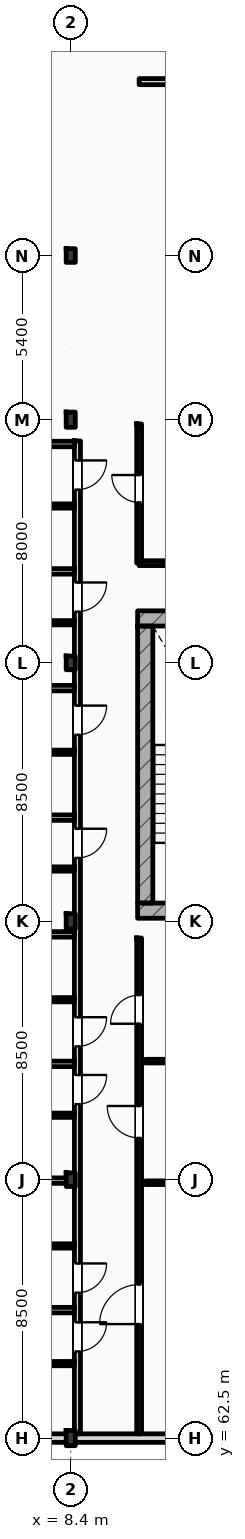
"""IFC4 building model, lengths in metres.
Left out: names, types, materials, properties, quantities, classifications, styles, units other than length and angle.
Written with IfcOpenShell. Run it as: python <this file> out.ifc"""

import sys

from ifc_helpers import new_model, si_unit, direction, frame, frame_2d, origin, origin_2d, place, context, subcontext, project, spatial, rectangle, i_section, extrude, element, fill, save


model = new_model("IFC4")
c1 = context("Model", 3, precision=1e-05, world=origin(), true_north=direction((0.0, 1.0)))
c2 = subcontext(c1, "Body", "Model", "MODEL_VIEW")
j1 = project(units=[si_unit("LENGTHUNIT", "METRE"), si_unit("PLANEANGLEUNIT", "RADIAN")], contexts=[c1])
p1 = place(None, origin())
s1 = spatial("IfcSite", under=j1, at=p1, CompositionType="ELEMENT")
p2 = place(p1, origin())
s2 = spatial("IfcBuilding", under=s1, at=p2, CompositionType="ELEMENT")
p3 = place(p2, frame((0.0, 0.0, 28.2)))
s3 = spatial("IfcBuildingStorey", under=s2, at=p3, CompositionType="ELEMENT", Elevation=28.2)
p4 = place(p3, frame((8.4, 62.5, 0.0), z_axis=(0.0, 0.0, 1.0), x_axis=(1.0, 0.0, 0.0)))
e1 = element("IfcColumn", 1, at=p4, inside=s3, PredefinedType="COLUMN", context=c2, shape_type="SweptSolid", body=[
    extrude(i_section(OverallWidth=0.3, OverallDepth=0.5, WebThickness=0.014, FlangeThickness=0.028, FilletRadius=0.027, at=origin_2d()), origin(), (0.0, 0.0, 1.0), 3.6),
])
p5 = place(p3, frame((8.4, 71.0, 0.0), z_axis=(0.0, 0.0, 1.0), x_axis=(1.0, 0.0, 0.0)))
e2 = element("IfcColumn", 2, at=p5, inside=s3, PredefinedType="COLUMN", context=c2, shape_type="SweptSolid", body=[
    extrude(i_section(OverallWidth=0.3, OverallDepth=0.45, WebThickness=0.014, FlangeThickness=0.026, FilletRadius=0.027, at=origin_2d()), origin(), (0.0, 0.0, 1.0), 3.6),
])
p6 = place(p3, frame((8.4, 79.5, 0.0), z_axis=(0.0, 0.0, 1.0), x_axis=(1.0, 0.0, 0.0)))
e3 = element("IfcColumn", 3, at=p6, inside=s3, PredefinedType="COLUMN", context=c2, shape_type="SweptSolid", body=[
    extrude(i_section(OverallWidth=0.3, OverallDepth=0.5, WebThickness=0.014, FlangeThickness=0.028, FilletRadius=0.027, at=origin_2d()), origin(), (0.0, 0.0, 1.0), 3.6),
])
p7 = place(p3, frame((8.4, 88.0, 0.0), z_axis=(0.0, 0.0, 1.0), x_axis=(1.0, 0.0, 0.0)))
e4 = element("IfcColumn", 4, at=p7, inside=s3, PredefinedType="COLUMN", context=c2, shape_type="SweptSolid", body=[
    extrude(i_section(OverallWidth=0.3, OverallDepth=0.45, WebThickness=0.014, FlangeThickness=0.026, FilletRadius=0.027, at=origin_2d()), origin(), (0.0, 0.0, 1.0), 3.6),
])
p8 = place(p3, frame((8.4, 96.0, 0.0), z_axis=(0.0, 0.0, 1.0), x_axis=(1.0, 0.0, 0.0)))
e5 = element("IfcColumn", 5, at=p8, inside=s3, PredefinedType="COLUMN", context=c2, shape_type="SweptSolid", body=[
    extrude(i_section(OverallWidth=0.3, OverallDepth=0.5, WebThickness=0.014, FlangeThickness=0.028, FilletRadius=0.027, at=origin_2d()), origin(), (0.0, 0.0, 1.0), 3.6),
])
p9 = place(p3, frame((8.4, 101.4, 0.0), z_axis=(0.0, 0.0, 1.0), x_axis=(1.0, 0.0, 0.0)))
e6 = element("IfcColumn", 6, at=p9, inside=s3, PredefinedType="COLUMN", context=c2, shape_type="SweptSolid", body=[
    extrude(i_section(OverallWidth=0.3, OverallDepth=0.45, WebThickness=0.014, FlangeThickness=0.026, FilletRadius=0.027, at=origin_2d()), origin(), (0.0, 0.0, 1.0), 3.6),
])
for number, where, z_axis, x_axis in (
    (7, (10.6, 89.462, 0.0), (0.0, 0.0, 1.0), (1.0, 0.0, 0.0)),
    (8, (10.6, 79.85, 0.0), (0.0, 0.0, 1.0), (1.0, 0.0, 0.0)),
):
    element("IfcWall", number, at=place(p3, frame(where, z_axis=z_axis, x_axis=x_axis)), inside=s3, PredefinedType="SHEAR", context=c2, shape_type="SweptSolid", body=[
        extrude(rectangle(XDim=5.16, YDim=0.5, at=frame_2d((2.58, 0.0))), origin(), (0.0, 0.0, 1.0), 3.6),
    ])
p10 = place(p3, frame((10.85, 80.1, 0.0), z_axis=(0.0, 0.0, 1.0), x_axis=(0.0, 1.0, 0.0)))
e9 = element("IfcWall", 9, at=p10, inside=s3, PredefinedType="SHEAR", context=c2, shape_type="SweptSolid", body=[
    extrude(rectangle(XDim=9.112, YDim=0.5, at=frame_2d((4.556, 0.0))), origin(), (0.0, 0.0, 1.0), 3.6),
])
p11 = place(p3, frame((0.0, 62.5, 0.0), z_axis=(0.0, 0.0, 1.0), x_axis=(1.0, 0.0, 0.0)))
e10 = element("IfcWall", 10, at=p11, inside=s3, PredefinedType="STANDARD", context=c2, shape_type="SweptSolid", body=[
    extrude(rectangle(XDim=25.2, YDim=0.28, at=frame_2d((12.6, 0.0))), origin(), (0.0, 0.0, 1.0), 2.8),
])
p12 = place(p3, frame((10.65, 107.12, 0.0), z_axis=(0.0, 0.0, 1.0), x_axis=(1.0, 0.0, 0.0)))
e11 = element("IfcWall", 11, at=p12, inside=s3, PredefinedType="PARTITIONING", context=c2, shape_type="SweptSolid", body=[
    extrude(rectangle(XDim=14.8, YDim=0.2, at=frame_2d((7.4, 0.0))), origin(), (0.0, 0.0, 1.0), 3.36),
])
p13 = place(p12, frame((8.5, 0.0, 0.0)))
e12 = element("IfcOpeningElement", 12, at=p13, cuts=e11, PredefinedType="OPENING", context=c2, shape_type="SweptSolid", body=[
    extrude(rectangle(XDim=1.25, YDim=2.15, at=frame_2d((0.625, 1.075))), frame((0.0, 0.11, 0.0), z_axis=(0.0, -1.0, 0.0), x_axis=(1.0, 0.0, 0.0)), (0.0, 0.0, 1.0), 0.22),
])
p14 = place(p3, frame((8.62, 62.64, 0.0), z_axis=(0.0, 0.0, 1.0), x_axis=(0.0, 1.0, 0.0)))
e13 = element("IfcWall", 13, at=p14, inside=s3, PredefinedType="PARTITIONING", context=c2, shape_type="SweptSolid", body=[
    extrude(rectangle(XDim=32.66, YDim=0.2, at=frame_2d((16.33, 0.0))), origin(), (0.0, 0.0, 1.0), 2.99),
])
p15 = place(p14, frame((2.71, 0.0, 0.0)))
e14 = element("IfcOpeningElement", 14, at=p15, cuts=e13, PredefinedType="OPENING", context=c2, shape_type="SweptSolid", body=[
    extrude(rectangle(XDim=0.96, YDim=2.2, at=frame_2d((0.48, 1.1))), frame((0.0, 0.11, 0.0), z_axis=(0.0, -1.0, 0.0), x_axis=(1.0, 0.0, 0.0)), (0.0, 0.0, 1.0), 0.22),
])
p16 = place(p14, frame((4.645, 0.0, 0.0)))
e15 = element("IfcOpeningElement", 15, at=p16, cuts=e13, PredefinedType="OPENING", context=c2, shape_type="SweptSolid", body=[
    extrude(rectangle(XDim=0.96, YDim=2.2, at=frame_2d((0.48, 1.1))), frame((0.0, 0.11, 0.0), z_axis=(0.0, -1.0, 0.0), x_axis=(1.0, 0.0, 0.0)), (0.0, 0.0, 1.0), 0.22),
])
p17 = place(p14, frame((10.845, 0.0, 0.0)))
e16 = element("IfcOpeningElement", 16, at=p17, cuts=e13, PredefinedType="OPENING", context=c2, shape_type="SweptSolid", body=[
    extrude(rectangle(XDim=0.96, YDim=2.2, at=frame_2d((0.48, 1.1))), frame((0.0, 0.11, 0.0), z_axis=(0.0, -1.0, 0.0), x_axis=(1.0, 0.0, 0.0)), (0.0, 0.0, 1.0), 0.22),
])
p18 = place(p14, frame((12.745, 0.0, 0.0)))
e17 = element("IfcOpeningElement", 17, at=p18, cuts=e13, PredefinedType="OPENING", context=c2, shape_type="SweptSolid", body=[
    extrude(rectangle(XDim=0.96, YDim=2.2, at=frame_2d((0.48, 1.1))), frame((0.0, 0.11, 0.0), z_axis=(0.0, -1.0, 0.0), x_axis=(1.0, 0.0, 0.0)), (0.0, 0.0, 1.0), 0.22),
])
p19 = place(p14, frame((18.945, 0.0, 0.0)))
e18 = element("IfcOpeningElement", 18, at=p19, cuts=e13, PredefinedType="OPENING", context=c2, shape_type="SweptSolid", body=[
    extrude(rectangle(XDim=0.96, YDim=2.2, at=frame_2d((0.48, 1.1))), frame((0.0, 0.11, 0.0), z_axis=(0.0, -1.0, 0.0), x_axis=(1.0, 0.0, 0.0)), (0.0, 0.0, 1.0), 0.22),
])
p20 = place(p14, frame((22.995, 0.0, 0.0)))
e19 = element("IfcOpeningElement", 19, at=p20, cuts=e13, PredefinedType="OPENING", context=c2, shape_type="SweptSolid", body=[
    extrude(rectangle(XDim=0.96, YDim=2.2, at=frame_2d((0.48, 1.1))), frame((0.0, 0.11, 0.0), z_axis=(0.0, -1.0, 0.0), x_axis=(1.0, 0.0, 0.0)), (0.0, 0.0, 1.0), 0.22),
])
p21 = place(p14, frame((27.045, 0.0, 0.0)))
e20 = element("IfcOpeningElement", 20, at=p21, cuts=e13, PredefinedType="OPENING", context=c2, shape_type="SweptSolid", body=[
    extrude(rectangle(XDim=0.96, YDim=2.2, at=frame_2d((0.48, 1.1))), frame((0.0, 0.11, 0.0), z_axis=(0.0, -1.0, 0.0), x_axis=(1.0, 0.0, 0.0)), (0.0, 0.0, 1.0), 0.22),
])
p22 = place(p14, frame((31.06, 0.0, 0.0)))
e21 = element("IfcOpeningElement", 21, at=p22, cuts=e13, PredefinedType="OPENING", context=c2, shape_type="SweptSolid", body=[
    extrude(rectangle(XDim=0.96, YDim=2.2, at=frame_2d((0.48, 1.1))), frame((0.0, 0.11, 0.0), z_axis=(0.0, -1.0, 0.0), x_axis=(1.0, 0.0, 0.0)), (0.0, 0.0, 1.0), 0.22),
])
p23 = place(p3, frame((10.65, 62.64, 0.0), z_axis=(0.0, 0.0, 1.0), x_axis=(0.0, 1.0, 0.0)))
e22 = element("IfcWall", 22, at=p23, inside=s3, PredefinedType="PARTITIONING", context=c2, shape_type="SweptSolid", body=[
    extrude(rectangle(XDim=16.31, YDim=0.16, at=frame_2d((8.155, 0.0))), origin(), (0.0, 0.0, 1.0), 3.36),
])
p24 = place(p23, frame((3.61, 0.0, 0.0)))
e23 = element("IfcOpeningElement", 23, at=p24, cuts=e22, PredefinedType="OPENING", context=c2, shape_type="SweptSolid", body=[
    extrude(rectangle(XDim=1.3, YDim=2.2, at=frame_2d((0.65, 1.1))), frame((0.0, 0.09, 0.0), z_axis=(0.0, -1.0, 0.0), x_axis=(1.0, 0.0, 0.0)), (0.0, 0.0, 1.0), 0.18),
])
p25 = place(p23, frame((9.735, 0.0, 0.0)))
e24 = element("IfcOpeningElement", 24, at=p25, cuts=e22, PredefinedType="OPENING", context=c2, shape_type="SweptSolid", body=[
    extrude(rectangle(XDim=1.05, YDim=2.12, at=frame_2d((0.525, 1.06))), frame((0.0, 0.09, 0.0), z_axis=(0.0, -1.0, 0.0), x_axis=(1.0, 0.0, 0.0)), (0.0, 0.0, 1.0), 0.18),
])
p26 = place(p23, frame((13.49, 0.0, 0.0)))
e25 = element("IfcOpeningElement", 25, at=p26, cuts=e22, PredefinedType="OPENING", context=c2, shape_type="SweptSolid", body=[
    extrude(rectangle(XDim=0.94, YDim=2.15, at=frame_2d((0.47, 1.075))), frame((0.0, 0.09, 0.0), z_axis=(0.0, -1.0, 0.0), x_axis=(1.0, 0.0, 0.0)), (0.0, 0.0, 1.0), 0.18),
])
p27 = place(p3, frame((10.65, 91.28, 0.0), z_axis=(0.0, 0.0, 1.0), x_axis=(0.0, 1.0, 0.0)))
e26 = element("IfcWall", 26, at=p27, inside=s3, PredefinedType="PARTITIONING", context=c2, shape_type="SweptSolid", body=[
    extrude(rectangle(XDim=4.58, YDim=0.16, at=frame_2d((2.29, 0.0))), origin(), (0.0, 0.0, 1.0), 3.36),
])
p28 = place(p27, frame((2.0, 0.0, 0.0)))
e27 = element("IfcOpeningElement", 27, at=p28, cuts=e26, PredefinedType="OPENING", context=c2, shape_type="SweptSolid", body=[
    extrude(rectangle(XDim=0.9, YDim=2.1, at=frame_2d((0.45, 1.05))), frame((0.0, 0.09, 0.0), z_axis=(0.0, -1.0, 0.0), x_axis=(1.0, 0.0, 0.0)), (0.0, 0.0, 1.0), 0.18),
])
p29 = place(p3, frame((10.65, 91.28, 0.0), z_axis=(0.0, 0.0, 1.0), x_axis=(1.0, 0.0, 0.0)))
e28 = element("IfcWall", 28, at=p29, inside=s3, PredefinedType="PARTITIONING", context=c2, shape_type="SweptSolid", body=[
    extrude(rectangle(XDim=6.9, YDim=0.16, at=frame_2d((3.45, 0.0))), origin(), (0.0, 0.0, 1.0), 3.36),
])
p30 = place(p3, frame((0.15, 66.71, 0.0), z_axis=(0.0, 0.0, 1.0), x_axis=(1.0, 0.0, 0.0)))
e29 = element("IfcWall", 29, at=p30, inside=s3, PredefinedType="PARTITIONING", context=c2, shape_type="SweptSolid", body=[
    extrude(rectangle(XDim=8.37, YDim=0.18, at=frame_2d((4.185, 0.0))), origin(), (0.0, 0.0, 1.0), 3.36),
])
p31 = place(p3, frame((5.05, 64.95, 0.0), z_axis=(0.0, 0.0, 1.0), x_axis=(1.0, 0.0, 0.0)))
e30 = element("IfcWall", 30, at=p31, inside=s3, PredefinedType="PARTITIONING", context=c2, shape_type="SweptSolid", body=[
    extrude(rectangle(XDim=3.47, YDim=0.14, at=frame_2d((1.735, 0.0))), origin(), (0.0, 0.0, 1.0), 3.36),
])
p32 = place(p3, frame((0.15, 70.97, 0.0), z_axis=(0.0, 0.0, 1.0), x_axis=(1.0, 0.0, 0.0)))
e31 = element("IfcWall", 31, at=p32, inside=s3, PredefinedType="PARTITIONING", context=c2, shape_type="SweptSolid", body=[
    extrude(rectangle(XDim=8.37, YDim=0.18, at=frame_2d((4.185, 0.0))), origin(), (0.0, 0.0, 1.0), 2.8),
])
p33 = place(p3, frame((5.05, 68.82, 0.0), z_axis=(0.0, 0.0, 1.0), x_axis=(1.0, 0.0, 0.0)))
e32 = element("IfcWall", 32, at=p33, inside=s3, PredefinedType="PARTITIONING", context=c2, shape_type="SweptSolid", body=[
    extrude(rectangle(XDim=3.47, YDim=0.14, at=frame_2d((1.735, 0.0))), origin(), (0.0, 0.0, 1.0), 3.36),
])
p34 = place(p3, frame((0.15, 74.81, 0.0), z_axis=(0.0, 0.0, 1.0), x_axis=(1.0, 0.0, 0.0)))
e33 = element("IfcWall", 33, at=p34, inside=s3, PredefinedType="PARTITIONING", context=c2, shape_type="SweptSolid", body=[
    extrude(rectangle(XDim=8.37, YDim=0.18, at=frame_2d((4.185, 0.0))), origin(), (0.0, 0.0, 1.0), 3.36),
])
p35 = place(p3, frame((5.05, 73.12, 0.0), z_axis=(0.0, 0.0, 1.0), x_axis=(1.0, 0.0, 0.0)))
e34 = element("IfcWall", 34, at=p35, inside=s3, PredefinedType="PARTITIONING", context=c2, shape_type="SweptSolid", body=[
    extrude(rectangle(XDim=3.47, YDim=0.14, at=frame_2d((1.735, 0.0))), origin(), (0.0, 0.0, 1.0), 3.36),
])
p36 = place(p3, frame((0.15, 79.07, 0.0), z_axis=(0.0, 0.0, 1.0), x_axis=(1.0, 0.0, 0.0)))
e35 = element("IfcWall", 35, at=p36, inside=s3, PredefinedType="PARTITIONING", context=c2, shape_type="SweptSolid", body=[
    extrude(rectangle(XDim=8.37, YDim=0.18, at=frame_2d((4.185, 0.0))), origin(), (0.0, 0.0, 1.0), 3.36),
])
p37 = place(p3, frame((5.05, 76.92, 0.0), z_axis=(0.0, 0.0, 1.0), x_axis=(1.0, 0.0, 0.0)))
e36 = element("IfcWall", 36, at=p37, inside=s3, PredefinedType="PARTITIONING", context=c2, shape_type="SweptSolid", body=[
    extrude(rectangle(XDim=3.47, YDim=0.14, at=frame_2d((1.735, 0.0))), origin(), (0.0, 0.0, 1.0), 3.36),
])
p38 = place(p3, frame((0.15, 82.91, 0.0), z_axis=(0.0, 0.0, 1.0), x_axis=(1.0, 0.0, 0.0)))
e37 = element("IfcWall", 37, at=p38, inside=s3, PredefinedType="PARTITIONING", context=c2, shape_type="SweptSolid", body=[
    extrude(rectangle(XDim=8.37, YDim=0.18, at=frame_2d((4.185, 0.0))), origin(), (0.0, 0.0, 1.0), 3.36),
])
p39 = place(p3, frame((5.05, 81.22, 0.0), z_axis=(0.0, 0.0, 1.0), x_axis=(1.0, 0.0, 0.0)))
e38 = element("IfcWall", 38, at=p39, inside=s3, PredefinedType="PARTITIONING", context=c2, shape_type="SweptSolid", body=[
    extrude(rectangle(XDim=3.47, YDim=0.14, at=frame_2d((1.735, 0.0))), origin(), (0.0, 0.0, 1.0), 3.36),
])
p40 = place(p3, frame((0.15, 87.17, 0.0), z_axis=(0.0, 0.0, 1.0), x_axis=(1.0, 0.0, 0.0)))
e39 = element("IfcWall", 39, at=p40, inside=s3, PredefinedType="PARTITIONING", context=c2, shape_type="SweptSolid", body=[
    extrude(rectangle(XDim=8.37, YDim=0.18, at=frame_2d((4.185, 0.0))), origin(), (0.0, 0.0, 1.0), 3.36),
])
p41 = place(p3, frame((5.05, 85.06, 0.0), z_axis=(0.0, 0.0, 1.0), x_axis=(1.0, 0.0, 0.0)))
e40 = element("IfcWall", 40, at=p41, inside=s3, PredefinedType="PARTITIONING", context=c2, shape_type="SweptSolid", body=[
    extrude(rectangle(XDim=3.47, YDim=0.14, at=frame_2d((1.735, 0.0))), origin(), (0.0, 0.0, 1.0), 3.36),
])
p42 = place(p3, frame((0.15, 91.01, 0.0), z_axis=(0.0, 0.0, 1.0), x_axis=(1.0, 0.0, 0.0)))
e41 = element("IfcWall", 41, at=p42, inside=s3, PredefinedType="PARTITIONING", context=c2, shape_type="SweptSolid", body=[
    extrude(rectangle(XDim=8.37, YDim=0.18, at=frame_2d((4.185, 0.0))), origin(), (0.0, 0.0, 1.0), 3.36),
])
p43 = place(p3, frame((5.05, 89.32, 0.0), z_axis=(0.0, 0.0, 1.0), x_axis=(1.0, 0.0, 0.0)))
e42 = element("IfcWall", 42, at=p43, inside=s3, PredefinedType="PARTITIONING", context=c2, shape_type="SweptSolid", body=[
    extrude(rectangle(XDim=3.47, YDim=0.14, at=frame_2d((1.735, 0.0))), origin(), (0.0, 0.0, 1.0), 3.36),
])
p44 = place(p3, frame((0.15, 95.2, 0.0), z_axis=(0.0, 0.0, 1.0), x_axis=(1.0, 0.0, 0.0)))
e43 = element("IfcWall", 43, at=p44, inside=s3, PredefinedType="PARTITIONING", context=c2, shape_type="SweptSolid", body=[
    extrude(rectangle(XDim=8.37, YDim=0.18, at=frame_2d((4.185, 0.0))), origin(), (0.0, 0.0, 1.0), 3.36),
])
p45 = place(p3, frame((5.05, 93.16, 0.0), z_axis=(0.0, 0.0, 1.0), x_axis=(1.0, 0.0, 0.0)))
e44 = element("IfcWall", 44, at=p45, inside=s3, PredefinedType="PARTITIONING", context=c2, shape_type="SweptSolid", body=[
    extrude(rectangle(XDim=3.47, YDim=0.14, at=frame_2d((1.735, 0.0))), origin(), (0.0, 0.0, 1.0), 3.36),
])
p46 = place(p3, frame((10.85, 70.9, 0.0), z_axis=(0.0, 0.0, 1.0), x_axis=(1.0, 0.0, 0.0)))
e45 = element("IfcWall", 45, at=p46, inside=s3, PredefinedType="PARTITIONING", context=c2, shape_type="SweptSolid", body=[
    extrude(rectangle(XDim=7.35, YDim=0.12, at=frame_2d((3.675, 0.0))), origin(), (0.0, 0.0, 1.0), 2.8),
])
p47 = place(p3, frame((10.85, 74.9, 0.0), z_axis=(0.0, 0.0, 1.0), x_axis=(1.0, 0.0, 0.0)))
e46 = element("IfcWall", 46, at=p47, inside=s3, PredefinedType="PARTITIONING", context=c2, shape_type="SweptSolid", body=[
    extrude(rectangle(XDim=5.35, YDim=0.12, at=frame_2d((2.675, 0.0))), origin(), (0.0, 0.0, 1.0), 3.36),
])
p48 = place(p15, frame((0.96, 0.0, 0.0), z_axis=(0.0, 0.0, 1.0), x_axis=(-1.0, 0.0, 0.0)))
e47 = element("IfcDoor", 47, at=p48, inside=s3, OperationType="SINGLE_SWING_RIGHT", PredefinedType="DOOR", context=c2, shape_type="SweptSolid", body=[
    extrude(rectangle(XDim=0.96, YDim=2.2, at=frame_2d((0.48, 1.1))), frame((0.0, 0.025, 0.0), z_axis=(0.0, -1.0, 0.0), x_axis=(1.0, 0.0, 0.0)), (0.0, 0.0, 1.0), 0.05),
])
fill(e14, e47)
p49 = place(p16, frame((0.96, 0.0, 0.0), z_axis=(0.0, 0.0, 1.0), x_axis=(-1.0, 0.0, 0.0)))
e48 = element("IfcDoor", 48, at=p49, inside=s3, OperationType="SINGLE_SWING_RIGHT", PredefinedType="DOOR", context=c2, shape_type="SweptSolid", body=[
    extrude(rectangle(XDim=0.96, YDim=2.2, at=frame_2d((0.48, 1.1))), frame((0.0, 0.025, 0.0), z_axis=(0.0, -1.0, 0.0), x_axis=(1.0, 0.0, 0.0)), (0.0, 0.0, 1.0), 0.05),
])
fill(e15, e48)
p50 = place(p17, frame((0.96, 0.0, 0.0), z_axis=(0.0, 0.0, 1.0), x_axis=(-1.0, 0.0, 0.0)))
e49 = element("IfcDoor", 49, at=p50, inside=s3, OperationType="SINGLE_SWING_RIGHT", PredefinedType="DOOR", context=c2, shape_type="SweptSolid", body=[
    extrude(rectangle(XDim=0.96, YDim=2.2, at=frame_2d((0.48, 1.1))), frame((0.0, 0.025, 0.0), z_axis=(0.0, -1.0, 0.0), x_axis=(1.0, 0.0, 0.0)), (0.0, 0.0, 1.0), 0.05),
])
fill(e16, e49)
p51 = place(p18, frame((0.96, 0.0, 0.0), z_axis=(0.0, 0.0, 1.0), x_axis=(-1.0, 0.0, 0.0)))
e50 = element("IfcDoor", 50, at=p51, inside=s3, OperationType="SINGLE_SWING_RIGHT", PredefinedType="DOOR", context=c2, shape_type="SweptSolid", body=[
    extrude(rectangle(XDim=0.96, YDim=2.2, at=frame_2d((0.48, 1.1))), frame((0.0, 0.025, 0.0), z_axis=(0.0, -1.0, 0.0), x_axis=(1.0, 0.0, 0.0)), (0.0, 0.0, 1.0), 0.05),
])
fill(e17, e50)
p52 = place(p19, frame((0.96, 0.0, 0.0), z_axis=(0.0, 0.0, 1.0), x_axis=(-1.0, 0.0, 0.0)))
e51 = element("IfcDoor", 51, at=p52, inside=s3, OperationType="SINGLE_SWING_RIGHT", PredefinedType="DOOR", context=c2, shape_type="SweptSolid", body=[
    extrude(rectangle(XDim=0.96, YDim=2.2, at=frame_2d((0.48, 1.1))), frame((0.0, 0.025, 0.0), z_axis=(0.0, -1.0, 0.0), x_axis=(1.0, 0.0, 0.0)), (0.0, 0.0, 1.0), 0.05),
])
fill(e18, e51)
p53 = place(p20, frame((0.96, 0.0, 0.0), z_axis=(0.0, 0.0, 1.0), x_axis=(-1.0, 0.0, 0.0)))
e52 = element("IfcDoor", 52, at=p53, inside=s3, OperationType="SINGLE_SWING_RIGHT", PredefinedType="DOOR", context=c2, shape_type="SweptSolid", body=[
    extrude(rectangle(XDim=0.96, YDim=2.2, at=frame_2d((0.48, 1.1))), frame((0.0, 0.025, 0.0), z_axis=(0.0, -1.0, 0.0), x_axis=(1.0, 0.0, 0.0)), (0.0, 0.0, 1.0), 0.05),
])
fill(e19, e52)
p54 = place(p21, frame((0.96, 0.0, 0.0), z_axis=(0.0, 0.0, 1.0), x_axis=(-1.0, 0.0, 0.0)))
e53 = element("IfcDoor", 53, at=p54, inside=s3, OperationType="SINGLE_SWING_RIGHT", PredefinedType="DOOR", context=c2, shape_type="SweptSolid", body=[
    extrude(rectangle(XDim=0.96, YDim=2.2, at=frame_2d((0.48, 1.1))), frame((0.0, 0.025, 0.0), z_axis=(0.0, -1.0, 0.0), x_axis=(1.0, 0.0, 0.0)), (0.0, 0.0, 1.0), 0.05),
])
fill(e20, e53)
p55 = place(p22, frame((0.96, 0.0, 0.0), z_axis=(0.0, 0.0, 1.0), x_axis=(-1.0, 0.0, 0.0)))
e54 = element("IfcDoor", 54, at=p55, inside=s3, OperationType="SINGLE_SWING_RIGHT", PredefinedType="DOOR", context=c2, shape_type="SweptSolid", body=[
    extrude(rectangle(XDim=0.96, YDim=2.2, at=frame_2d((0.48, 1.1))), frame((0.0, 0.025, 0.0), z_axis=(0.0, -1.0, 0.0), x_axis=(1.0, 0.0, 0.0)), (0.0, 0.0, 1.0), 0.05),
])
fill(e21, e54)
p56 = place(p24, origin())
e55 = element("IfcDoor", 55, at=p56, inside=s3, OperationType="SINGLE_SWING_LEFT", PredefinedType="DOOR", context=c2, shape_type="SweptSolid", body=[
    extrude(rectangle(XDim=1.3, YDim=2.2, at=frame_2d((0.65, 1.1))), frame((0.0, 0.025, 0.0), z_axis=(0.0, -1.0, 0.0), x_axis=(1.0, 0.0, 0.0)), (0.0, 0.0, 1.0), 0.05),
])
fill(e23, e55)
p57 = place(p25, origin())
e56 = element("IfcDoor", 56, at=p57, inside=s3, OperationType="SINGLE_SWING_RIGHT", PredefinedType="DOOR", context=c2, shape_type="SweptSolid", body=[
    extrude(rectangle(XDim=1.05, YDim=2.12, at=frame_2d((0.525, 1.06))), frame((0.0, 0.025, 0.0), z_axis=(0.0, -1.0, 0.0), x_axis=(1.0, 0.0, 0.0)), (0.0, 0.0, 1.0), 0.05),
])
fill(e24, e56)
p58 = place(p26, origin())
e57 = element("IfcDoor", 57, at=p58, inside=s3, OperationType="SINGLE_SWING_LEFT", PredefinedType="DOOR", context=c2, shape_type="SweptSolid", body=[
    extrude(rectangle(XDim=0.94, YDim=2.15, at=frame_2d((0.47, 1.075))), frame((0.0, 0.025, 0.0), z_axis=(0.0, -1.0, 0.0), x_axis=(1.0, 0.0, 0.0)), (0.0, 0.0, 1.0), 0.05),
])
fill(e25, e57)
p59 = place(p28, origin())
e58 = element("IfcDoor", 58, at=p59, inside=s3, OperationType="SINGLE_SWING_RIGHT", PredefinedType="DOOR", context=c2, shape_type="SweptSolid", body=[
    extrude(rectangle(XDim=0.9, YDim=2.1, at=frame_2d((0.45, 1.05))), frame((0.0, 0.025, 0.0), z_axis=(0.0, -1.0, 0.0), x_axis=(1.0, 0.0, 0.0)), (0.0, 0.0, 1.0), 0.05),
])
fill(e27, e58)
save(model, sys.argv[1])
